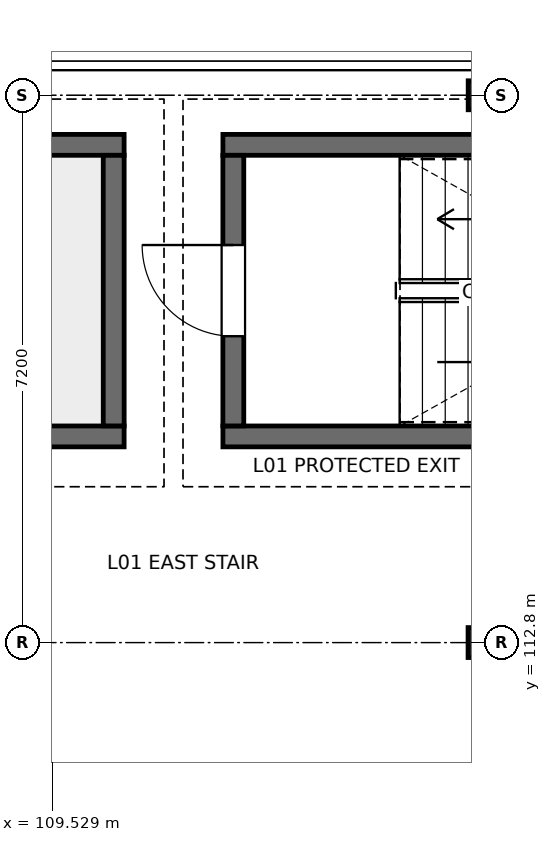
"""IFC4 building model, lengths in metres.
Left out: names, types, materials, properties, quantities, classifications, styles, units other than length and angle.
Written with IfcOpenShell. Run it as: python <this file> out.ifc"""

import sys

from ifc_helpers import new_model, si_unit, direction, frame, frame_2d, origin, origin_2d, place, context, subcontext, project, spatial, rectangle, i_section, extrude, element, fill, save


model = new_model("IFC4")
c1 = context("Model", 3, precision=1e-05, world=origin(), true_north=direction((0.0, 1.0)))
c2 = subcontext(c1, "Body", "Model", "MODEL_VIEW")
j1 = project(units=[si_unit("LENGTHUNIT", "METRE"), si_unit("PLANEANGLEUNIT", "RADIAN")], contexts=[c1])
p1 = place(None, origin())
s1 = spatial("IfcSite", under=j1, at=p1, CompositionType="ELEMENT")
p2 = place(p1, origin())
s2 = spatial("IfcBuilding", under=s1, at=p2, CompositionType="ELEMENT")
p3 = place(p2, frame((0.0, 0.0, 5.4)))
s3 = spatial("IfcBuildingStorey", under=s2, at=p3, CompositionType="ELEMENT", Elevation=5.4)
p4 = place(p3, frame((115.2, 112.8, 0.0), z_axis=(0.0, 0.0, 1.0), x_axis=(1.0, 0.0, 0.0)))
e1 = element("IfcColumn", 1, at=p4, inside=s3, PredefinedType="COLUMN", context=c2, shape_type="SweptSolid", body=[
    extrude(i_section(OverallWidth=0.399, OverallDepth=0.394, WebThickness=0.023, FlangeThickness=0.037, FilletRadius=0.015, at=origin_2d()), origin(), (0.0, 0.0, 1.0), 3.9),
])
p5 = place(p3, frame((115.2, 120.0, 0.0), z_axis=(0.0, 0.0, 1.0), x_axis=(1.0, 0.0, 0.0)))
e2 = element("IfcColumn", 2, at=p5, inside=s3, PredefinedType="COLUMN", context=c2, shape_type="SweptSolid", body=[
    extrude(i_section(OverallWidth=0.396, OverallDepth=0.381, WebThickness=0.019, FlangeThickness=0.03, FilletRadius=0.015, at=origin_2d()), origin(), (0.0, 0.0, 1.0), 3.9),
])
for number, where, z_axis, x_axis in (
    (3, (110.475, 115.512, 0.0), (0.0, 0.0, 1.0), (-1.0, 0.0, 0.0)),
    (4, (101.575, 119.348, 0.0), (0.0, 0.0, 1.0), (1.0, 0.0, 0.0)),
):
    element("IfcWall", number, at=place(p3, frame(where, z_axis=z_axis, x_axis=x_axis)), inside=s3, PredefinedType="SOLIDWALL", context=c2, shape_type="SweptSolid", body=[
        extrude(rectangle(XDim=8.9, YDim=0.275, at=frame_2d((4.45, 0.0))), origin(), (0.0, 0.0, 1.0), 3.67),
    ])
p6 = place(p3, frame((110.338, 119.21, 0.0), z_axis=(0.0, 0.0, 1.0), x_axis=(0.0, -1.0, 0.0)))
e5 = element("IfcWall", 5, at=p6, inside=s3, PredefinedType="SOLIDWALL", context=c2, shape_type="SweptSolid", body=[
    extrude(rectangle(XDim=3.56, YDim=0.275, at=frame_2d((1.78, 0.0))), origin(), (0.0, 0.0, 1.0), 3.67),
])
for number, where, z_axis, x_axis in (
    (6, (120.725, 115.512, 0.0), (0.0, 0.0, 1.0), (-1.0, 0.0, 0.0)),
    (7, (111.775, 119.348, 0.0), (0.0, 0.0, 1.0), (1.0, 0.0, 0.0)),
):
    element("IfcWall", number, at=place(p3, frame(where, z_axis=z_axis, x_axis=x_axis)), inside=s3, PredefinedType="SOLIDWALL", context=c2, shape_type="SweptSolid", body=[
        extrude(rectangle(XDim=8.95, YDim=0.275, at=frame_2d((4.475, 0.0))), origin(), (0.0, 0.0, 1.0), 3.67),
    ])
p7 = place(p3, frame((111.912, 115.65, 0.0), z_axis=(0.0, 0.0, 1.0), x_axis=(0.0, 1.0, 0.0)))
e8 = element("IfcWall", 8, at=p7, inside=s3, PredefinedType="SOLIDWALL", context=c2, shape_type="SweptSolid", body=[
    extrude(rectangle(XDim=3.56, YDim=0.275, at=frame_2d((1.78, 0.0))), origin(), (0.0, 0.0, 1.0), 3.67),
])
p8 = place(p7, frame((1.18, 0.0, 0.0)))
e9 = element("IfcOpeningElement", 9, at=p8, cuts=e8, PredefinedType="OPENING", context=c2, shape_type="SweptSolid", body=[
    extrude(rectangle(XDim=1.2, YDim=2.2, at=frame_2d((0.6, 1.1))), frame((0.0, 0.147, 0.0), z_axis=(0.0, -1.0, 0.0), x_axis=(1.0, 0.0, 0.0)), (0.0, 0.0, 1.0), 0.295),
])
p9 = place(p8, origin())
e10 = element("IfcDoor", 10, at=p9, inside=s3, OperationType="SINGLE_SWING_RIGHT", PredefinedType="DOOR", context=c2, shape_type="SweptSolid", body=[
    extrude(rectangle(XDim=1.2, YDim=2.2, at=frame_2d((0.6, 1.1))), frame((0.0, 0.025, 0.0), z_axis=(0.0, -1.0, 0.0), x_axis=(1.0, 0.0, 0.0)), (0.0, 0.0, 1.0), 0.05),
])
fill(e9, e10)
save(model, sys.argv[1])
